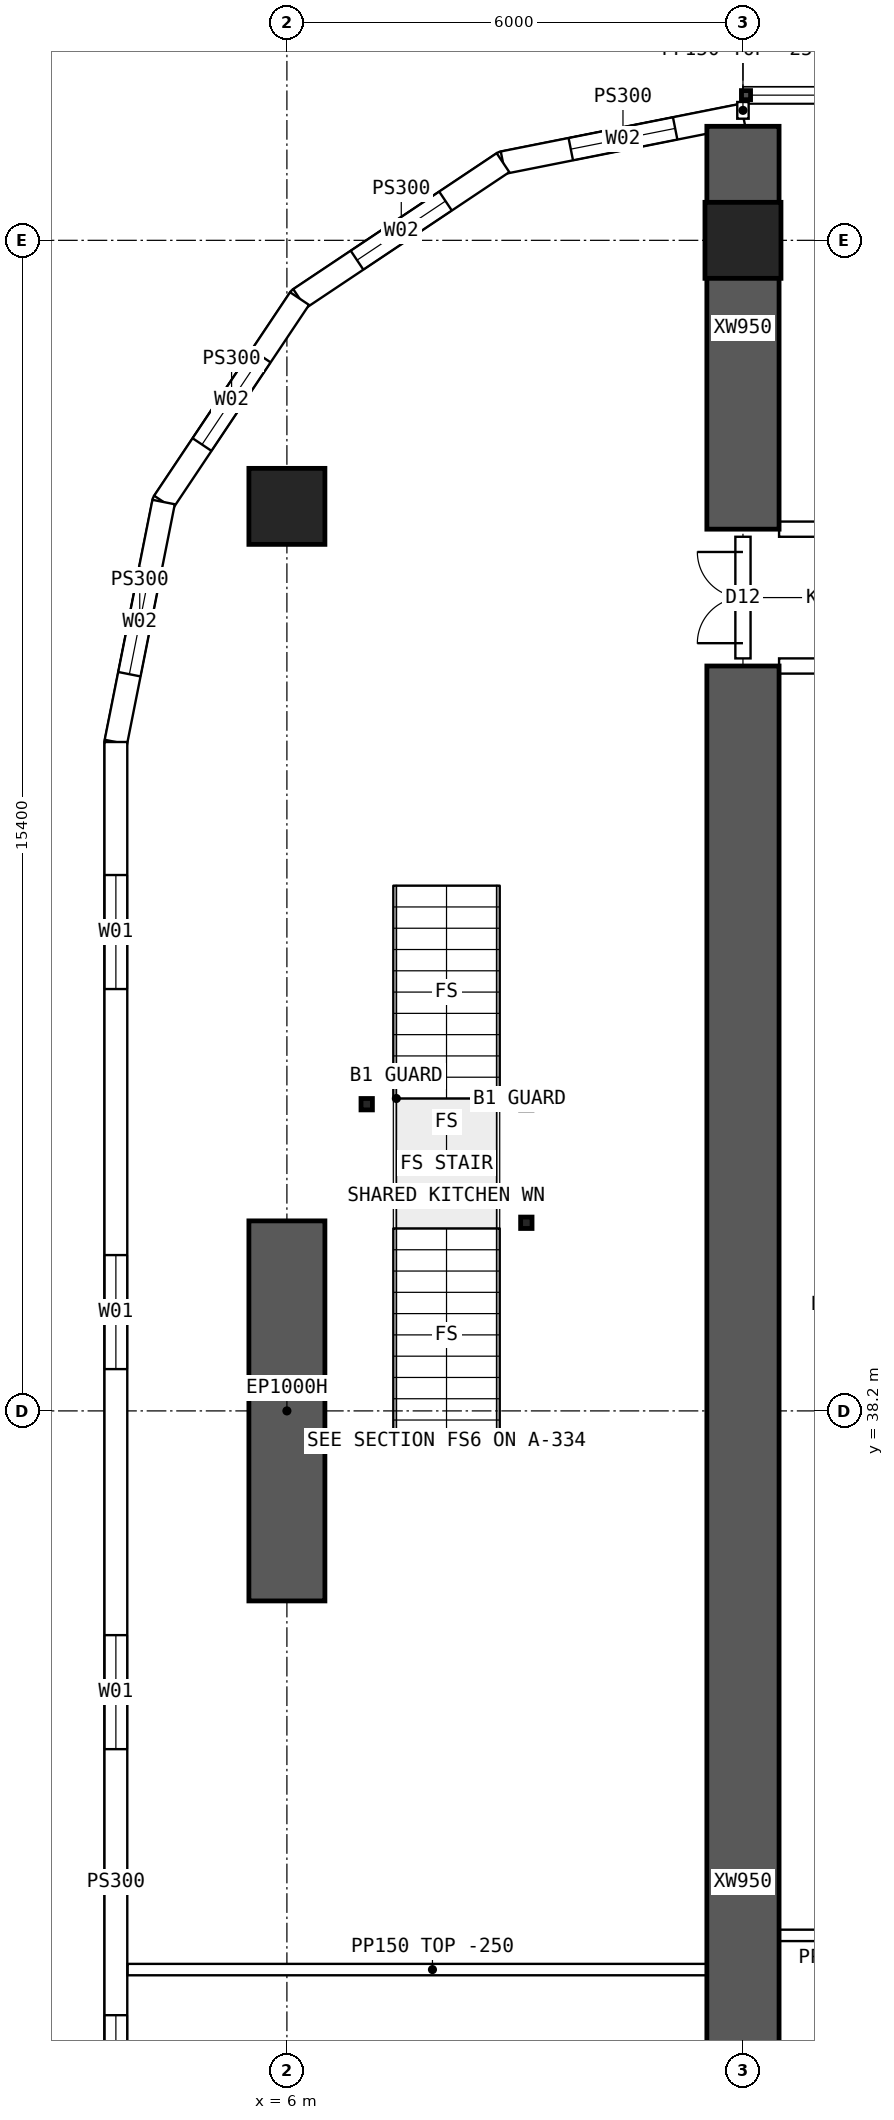
"""IFC4 building model, lengths in metres.
Left out: names, types, materials, properties, quantities, classifications, styles, units other than length and angle.
Written with IfcOpenShell. Run it as: python <this file> out.ifc"""

import sys

from ifc_helpers import new_model, si_unit, direction, frame, frame_2d, origin, origin_2d, place, context, subcontext, project, spatial, polyline, rectangle, hollow_rectangle, outline, extrude, element, fill, save


model = new_model("IFC4")
c1 = context("Model", 3, precision=1e-05, world=origin(), true_north=direction((0.0, 1.0)))
c2 = subcontext(c1, "Body", "Model", "MODEL_VIEW")
j1 = project(units=[si_unit("LENGTHUNIT", "METRE"), si_unit("PLANEANGLEUNIT", "RADIAN")], contexts=[c1])
p1 = place(None, origin())
s1 = spatial("IfcSite", under=j1, at=p1, CompositionType="ELEMENT")
p2 = place(p1, origin())
s2 = spatial("IfcBuilding", under=s1, at=p2, CompositionType="ELEMENT")
p3 = place(p2, frame((0.0, 0.0, 99.4)))
s3 = spatial("IfcBuildingStorey", under=s2, at=p3, CompositionType="ELEMENT", Elevation=99.4)
for number, where, z_axis, x_axis in (
    (1, (12.0, 53.6, 0.0), (0.0, 0.0, 1.0), (1.0, 0.0, 0.0)),
    (2, (6.0, 50.1, 0.0), (0.0, 0.0, 1.0), (1.0, 0.0, 0.0)),
):
    element("IfcColumn", number, at=place(p3, frame(where, z_axis=z_axis, x_axis=x_axis)), inside=s3, PredefinedType="COLUMN", context=c2, shape_type="SweptSolid", body=[
        extrude(hollow_rectangle(XDim=1.0, YDim=1.0, WallThickness=0.1, at=origin_2d()), origin(), (0.0, 0.0, 1.0), 3.75),
    ])
p4 = place(p3, frame((6.0, 35.7, 0.0), z_axis=(0.0, 0.0, 1.0), x_axis=(0.0, 1.0, 0.0)))
e3 = element("IfcWall", 3, at=p4, inside=s3, PredefinedType="SHEAR", context=c2, shape_type="SweptSolid", body=[
    extrude(rectangle(XDim=5.0, YDim=1.0, at=frame_2d((2.5, 0.0))), origin(), (0.0, 0.0, 1.0), 3.75),
])
p5 = place(p3, frame((12.0, 49.8, 0.0), z_axis=(0.0, 0.0, 1.0), x_axis=(0.0, 1.0, 0.0)))
e4 = element("IfcWall", 4, at=p5, inside=s3, PredefinedType="SHEAR", context=c2, shape_type="SweptSolid", body=[
    extrude(rectangle(XDim=5.3, YDim=0.95, at=frame_2d((2.65, 0.0))), origin(), (0.0, 0.0, 1.0), 3.75),
])
p6 = place(p3, frame((12.0, 16.0, 0.0), z_axis=(0.0, 0.0, 1.0), x_axis=(0.0, 1.0, 0.0)))
e5 = element("IfcWall", 5, at=p6, inside=s3, PredefinedType="SHEAR", context=c2, shape_type="SweptSolid", body=[
    extrude(rectangle(XDim=32.0, YDim=0.95, at=frame_2d((16.0, 0.0))), origin(), (0.0, 0.0, 1.0), 3.75),
])
p7 = place(p3, frame((3.75, 47.0, 0.0), z_axis=(0.0, 0.0, 1.0), x_axis=(0.0, -1.0, 0.0)))
e6 = element("IfcWall", 6, at=p7, inside=s3, PredefinedType="SOLIDWALL", context=c2, shape_type="SweptSolid", body=[
    extrude(outline(polyline([(-0.015, -0.15), (30.015, -0.15), (29.985, 0.15), (0.015, 0.15), (-0.015, -0.15)])), origin(), (0.0, 0.0, 1.0), 3.5),
])
p8 = place(p7, frame((1.75, 0.0, 0.9)))
e7 = element("IfcOpeningElement", 7, at=p8, cuts=e6, PredefinedType="OPENING", context=c2, shape_type="SweptSolid", body=[
    extrude(rectangle(XDim=1.5, YDim=2.0, at=frame_2d((0.75, 1.0))), frame((0.0, 0.16, 0.0), z_axis=(0.0, -1.0, 0.0), x_axis=(1.0, 0.0, 0.0)), (0.0, 0.0, 1.0), 0.32),
])
p9 = place(p7, frame((6.75, 0.0, 0.9)))
e8 = element("IfcOpeningElement", 8, at=p9, cuts=e6, PredefinedType="OPENING", context=c2, shape_type="SweptSolid", body=[
    extrude(rectangle(XDim=1.5, YDim=2.0, at=frame_2d((0.75, 1.0))), frame((0.0, 0.16, 0.0), z_axis=(0.0, -1.0, 0.0), x_axis=(1.0, 0.0, 0.0)), (0.0, 0.0, 1.0), 0.32),
])
p10 = place(p7, frame((11.75, 0.0, 0.9)))
e9 = element("IfcOpeningElement", 9, at=p10, cuts=e6, PredefinedType="OPENING", context=c2, shape_type="SweptSolid", body=[
    extrude(rectangle(XDim=1.5, YDim=2.0, at=frame_2d((0.75, 1.0))), frame((0.0, 0.16, 0.0), z_axis=(0.0, -1.0, 0.0), x_axis=(1.0, 0.0, 0.0)), (0.0, 0.0, 1.0), 0.32),
])
p11 = place(p7, frame((16.75, 0.0, 0.9)))
e10 = element("IfcOpeningElement", 10, at=p11, cuts=e6, PredefinedType="OPENING", context=c2, shape_type="SweptSolid", body=[
    extrude(rectangle(XDim=1.5, YDim=2.0, at=frame_2d((0.75, 1.0))), frame((0.0, 0.16, 0.0), z_axis=(0.0, -1.0, 0.0), x_axis=(1.0, 0.0, 0.0)), (0.0, 0.0, 1.0), 0.32),
])
p12 = place(p7, frame((21.75, 0.0, 0.9)))
e11 = element("IfcOpeningElement", 11, at=p12, cuts=e6, PredefinedType="OPENING", context=c2, shape_type="SweptSolid", body=[
    extrude(rectangle(XDim=1.5, YDim=2.0, at=frame_2d((0.75, 1.0))), frame((0.0, 0.16, 0.0), z_axis=(0.0, -1.0, 0.0), x_axis=(1.0, 0.0, 0.0)), (0.0, 0.0, 1.0), 0.32),
])
p13 = place(p7, frame((26.75, 0.0, 0.9)))
e12 = element("IfcOpeningElement", 12, at=p13, cuts=e6, PredefinedType="OPENING", context=c2, shape_type="SweptSolid", body=[
    extrude(rectangle(XDim=1.5, YDim=2.0, at=frame_2d((0.75, 1.0))), frame((0.0, 0.16, 0.0), z_axis=(0.0, -1.0, 0.0), x_axis=(1.0, 0.0, 0.0)), (0.0, 0.0, 1.0), 0.32),
])
p14 = place(p3, frame((12.0, 55.25, 0.0), z_axis=(0.0, 0.0, 1.0), x_axis=(-0.980787251524, -0.195080412259, 0.0)))
e13 = element("IfcWall", 13, at=p14, inside=s3, PredefinedType="SOLIDWALL", context=c2, shape_type="SweptSolid", body=[
    extrude(outline(polyline([(-0.03, -0.15), (3.249, -0.15), (3.189, 0.15), (0.03, 0.15), (-0.03, -0.15)])), origin(), (0.0, 0.0, 1.0), 3.5),
])
p15 = place(p14, frame((0.909, 0.0, 0.9)))
e14 = element("IfcOpeningElement", 14, at=p15, cuts=e13, PredefinedType="OPENING", context=c2, shape_type="SweptSolid", body=[
    extrude(rectangle(XDim=1.4, YDim=1.8, at=frame_2d((0.7, 0.9))), frame((0.0, 0.16, 0.0), z_axis=(0.0, -1.0, 0.0), x_axis=(1.0, 0.0, 0.0)), (0.0, 0.0, 1.0), 0.32),
])
p16 = place(p3, frame((8.843, 54.622, 0.0), z_axis=(0.0, 0.0, 1.0), x_axis=(-0.831443069936, -0.555609954424, 0.0)))
e15 = element("IfcWall", 15, at=p16, inside=s3, PredefinedType="SOLIDWALL", context=c2, shape_type="SweptSolid", body=[
    extrude(outline(polyline([(-0.03, -0.15), (3.249, -0.15), (3.189, 0.15), (0.03, 0.15), (-0.03, -0.15)])), origin(), (0.0, 0.0, 1.0), 3.5),
])
p17 = place(p16, frame((0.909, 0.0, 0.9)))
e16 = element("IfcOpeningElement", 16, at=p17, cuts=e15, PredefinedType="OPENING", context=c2, shape_type="SweptSolid", body=[
    extrude(rectangle(XDim=1.4, YDim=1.8, at=frame_2d((0.7, 0.9))), frame((0.0, 0.16, 0.0), z_axis=(0.0, -1.0, 0.0), x_axis=(1.0, 0.0, 0.0)), (0.0, 0.0, 1.0), 0.32),
])
p18 = place(p3, frame((6.167, 52.833, 0.0), z_axis=(0.0, 0.0, 1.0), x_axis=(-0.555609954424, -0.831443069936, 0.0)))
e17 = element("IfcWall", 17, at=p18, inside=s3, PredefinedType="SOLIDWALL", context=c2, shape_type="SweptSolid", body=[
    extrude(outline(polyline([(-0.03, -0.15), (3.249, -0.15), (3.189, 0.15), (0.03, 0.15), (-0.03, -0.15)])), origin(), (0.0, 0.0, 1.0), 3.5),
])
p19 = place(p18, frame((0.909, 0.0, 0.9)))
e18 = element("IfcOpeningElement", 18, at=p19, cuts=e17, PredefinedType="OPENING", context=c2, shape_type="SweptSolid", body=[
    extrude(rectangle(XDim=1.4, YDim=1.8, at=frame_2d((0.7, 0.9))), frame((0.0, 0.16, 0.0), z_axis=(0.0, -1.0, 0.0), x_axis=(1.0, 0.0, 0.0)), (0.0, 0.0, 1.0), 0.32),
])
p20 = place(p3, frame((4.378, 50.157, 0.0), z_axis=(0.0, 0.0, 1.0), x_axis=(-0.195080412259, -0.980787251524, 0.0)))
e19 = element("IfcWall", 19, at=p20, inside=s3, PredefinedType="SOLIDWALL", context=c2, shape_type="SweptSolid", body=[
    extrude(outline(polyline([(-0.03, -0.15), (3.234, -0.15), (3.204, 0.15), (0.03, 0.15), (-0.03, -0.15)])), origin(), (0.0, 0.0, 1.0), 3.5),
])
p21 = place(p20, frame((0.909, 0.0, 0.9)))
e20 = element("IfcOpeningElement", 20, at=p21, cuts=e19, PredefinedType="OPENING", context=c2, shape_type="SweptSolid", body=[
    extrude(rectangle(XDim=1.4, YDim=1.8, at=frame_2d((0.7, 0.9))), frame((0.0, 0.16, 0.0), z_axis=(0.0, -1.0, 0.0), x_axis=(1.0, 0.0, 0.0)), (0.0, 0.0, 1.0), 0.32),
])
p22 = place(p3, frame((12.475, 49.8, 0.0), z_axis=(0.0, 0.0, 1.0), x_axis=(1.0, 0.0, 0.0)))
e21 = element("IfcWall", 21, at=p22, inside=s3, PredefinedType="SOLIDWALL", context=c2, shape_type="SweptSolid", body=[
    extrude(outline(polyline([(0.0, 0.0), (5.05, 0.0), (5.05, 3.1), (0.0, 3.1), (0.0, 0.0)])), frame((0.0, 0.1, 0.0), z_axis=(0.0, -1.0, 0.0), x_axis=(1.0, 0.0, 0.0)), (0.0, 0.0, 1.0), 0.2),
])
p23 = place(p22, frame((0.6, 0.0, 0.0)))
e22 = element("IfcOpeningElement", 22, at=p23, cuts=e21, PredefinedType="OPENING", context=c2, shape_type="SweptSolid", body=[
    extrude(rectangle(XDim=1.0, YDim=2.1, at=frame_2d((0.5, 1.05))), frame((0.0, 0.11, 0.0), z_axis=(0.0, -1.0, 0.0), x_axis=(1.0, 0.0, 0.0)), (0.0, 0.0, 1.0), 0.22),
])
p24 = place(p3, frame((12.475, 48.0, 0.0), z_axis=(0.0, 0.0, 1.0), x_axis=(1.0, 0.0, 0.0)))
e23 = element("IfcWall", 23, at=p24, inside=s3, PredefinedType="SOLIDWALL", context=c2, shape_type="SweptSolid", body=[
    extrude(rectangle(XDim=5.05, YDim=0.2, at=frame_2d((2.525, 0.0))), origin(), (0.0, 0.0, 1.0), 3.5),
])
p25 = place(p24, frame((3.325, 0.0, 0.0)))
e24 = element("IfcOpeningElement", 24, at=p25, cuts=e23, PredefinedType="OPENING", context=c2, shape_type="SweptSolid", body=[
    extrude(rectangle(XDim=1.6, YDim=2.1, at=frame_2d((0.8, 1.05))), frame((0.0, 0.11, 0.0), z_axis=(0.0, -1.0, 0.0), x_axis=(1.0, 0.0, 0.0)), (0.0, 0.0, 1.0), 0.22),
])
p26 = place(p3, frame((12.0, 31.3, 0.0), z_axis=(0.0, 0.0, 1.0), x_axis=(1.0, 0.0, 0.0)))
e25 = element("IfcWall", 25, at=p26, inside=s3, PredefinedType="PARTITIONING", context=c2, shape_type="SweptSolid", body=[
    extrude(rectangle(XDim=3.6, YDim=0.15, at=frame_2d((1.8, 0.0))), origin(), (0.0, 0.0, 1.0), 3.5),
])
p27 = place(p3, frame((3.905, 30.85, 0.0), z_axis=(0.0, 0.0, 1.0), x_axis=(1.0, 0.0, 0.0)))
e26 = element("IfcWall", 26, at=p27, inside=s3, PredefinedType="PARTITIONING", context=c2, shape_type="SweptSolid", body=[
    extrude(outline(polyline([(0.0, 0.0), (8.02, 0.0), (8.02, 3.5), (2.397, 3.5), (2.395, 3.05), (1.797, 3.05), (1.795, 3.5), (0.0, 3.5), (0.0, 0.0)])), frame((0.0, 0.075, 0.0), z_axis=(0.0, -1.0, 0.0), x_axis=(1.0, 0.0, 0.0)), (0.0, 0.0, 1.0), 0.15),
])
p28 = place(p3, frame((12.0, 48.1, 0.0), z_axis=(0.0, 0.0, 1.0), x_axis=(0.0, 1.0, 0.0)))
e27 = element("IfcWall", 27, at=p28, inside=s3, PredefinedType="SOLIDWALL", context=c2, shape_type="SweptSolid", body=[
    extrude(outline(polyline([(0.0, 0.0), (1.6, 0.0), (1.6, 3.1), (0.0, 3.1), (0.0, 0.0)])), frame((0.0, 0.1, 0.0), z_axis=(0.0, -1.0, 0.0), x_axis=(1.0, 0.0, 0.0)), (0.0, 0.0, 1.0), 0.2),
])
p29 = place(p28, frame((0.2, 0.0, 0.0)))
e28 = element("IfcOpeningElement", 28, at=p29, cuts=e27, PredefinedType="OPENING", context=c2, shape_type="SweptSolid", body=[
    extrude(rectangle(XDim=1.2, YDim=2.1, at=frame_2d((0.6, 1.05))), frame((0.0, 0.11, 0.0), z_axis=(0.0, -1.0, 0.0), x_axis=(1.0, 0.0, 0.0)), (0.0, 0.0, 1.0), 0.22),
])
p30 = place(p3, frame((12.0, 55.2, 0.0), z_axis=(0.0, 0.0, 1.0), x_axis=(0.0, 1.0, 0.0)))
e29 = element("IfcWall", 29, at=p30, inside=s3, PredefinedType="PARTITIONING", context=c2, shape_type="SweptSolid", body=[
    extrude(rectangle(XDim=0.22, YDim=0.15, at=frame_2d((0.11, 0.0))), origin(), (0.0, 0.0, 1.0), 3.5),
])
for number, where, z_axis, x_axis in (
    (30, (9.15, 40.675, 0.0), (0.0, 0.0, 1.0), (1.0, 0.0, 0.0)),
    (31, (7.05, 42.235, 0.0), (0.0, 0.0, 1.0), (1.0, 0.0, 0.0)),
    (32, (9.15, 42.235, 0.0), (0.0, 0.0, 1.0), (1.0, 0.0, 0.0)),
):
    element("IfcColumn", number, at=place(p3, frame(where, z_axis=z_axis, x_axis=x_axis)), inside=s3, PredefinedType="COLUMN", context=c2, shape_type="SweptSolid", body=[
        extrude(hollow_rectangle(XDim=0.15, YDim=0.15, WallThickness=0.008, at=origin_2d()), origin(), (0.0, 0.0, 1.0), 3.5),
    ])
p31 = place(p8, origin())
e33 = element("IfcWindow", 33, at=p31, inside=s3, PartitioningType="SINGLE_PANEL", PredefinedType="WINDOW", context=c2, shape_type="SweptSolid", body=[
    extrude(rectangle(XDim=1.5, YDim=2.0, at=frame_2d((0.75, 1.0))), frame((0.0, 0.03, 0.0), z_axis=(0.0, -1.0, 0.0), x_axis=(1.0, 0.0, 0.0)), (0.0, 0.0, 1.0), 0.06),
])
fill(e7, e33)
p32 = place(p9, origin())
e34 = element("IfcWindow", 34, at=p32, inside=s3, PartitioningType="SINGLE_PANEL", PredefinedType="WINDOW", context=c2, shape_type="SweptSolid", body=[
    extrude(rectangle(XDim=1.5, YDim=2.0, at=frame_2d((0.75, 1.0))), frame((0.0, 0.03, 0.0), z_axis=(0.0, -1.0, 0.0), x_axis=(1.0, 0.0, 0.0)), (0.0, 0.0, 1.0), 0.06),
])
fill(e8, e34)
p33 = place(p10, origin())
e35 = element("IfcWindow", 35, at=p33, inside=s3, PartitioningType="SINGLE_PANEL", PredefinedType="WINDOW", context=c2, shape_type="SweptSolid", body=[
    extrude(rectangle(XDim=1.5, YDim=2.0, at=frame_2d((0.75, 1.0))), frame((0.0, 0.03, 0.0), z_axis=(0.0, -1.0, 0.0), x_axis=(1.0, 0.0, 0.0)), (0.0, 0.0, 1.0), 0.06),
])
fill(e9, e35)
p34 = place(p11, origin())
e36 = element("IfcWindow", 36, at=p34, inside=s3, PartitioningType="SINGLE_PANEL", PredefinedType="WINDOW", context=c2, shape_type="SweptSolid", body=[
    extrude(rectangle(XDim=1.5, YDim=2.0, at=frame_2d((0.75, 1.0))), frame((0.0, 0.03, 0.0), z_axis=(0.0, -1.0, 0.0), x_axis=(1.0, 0.0, 0.0)), (0.0, 0.0, 1.0), 0.06),
])
fill(e10, e36)
p35 = place(p15, origin())
e37 = element("IfcWindow", 37, at=p35, inside=s3, PartitioningType="SINGLE_PANEL", PredefinedType="WINDOW", context=c2, shape_type="SweptSolid", body=[
    extrude(rectangle(XDim=1.4, YDim=1.8, at=frame_2d((0.7, 0.9))), frame((0.0, 0.03, 0.0), z_axis=(0.0, -1.0, 0.0), x_axis=(1.0, 0.0, 0.0)), (0.0, 0.0, 1.0), 0.06),
])
fill(e14, e37)
p36 = place(p17, origin())
e38 = element("IfcWindow", 38, at=p36, inside=s3, PartitioningType="SINGLE_PANEL", PredefinedType="WINDOW", context=c2, shape_type="SweptSolid", body=[
    extrude(rectangle(XDim=1.4, YDim=1.8, at=frame_2d((0.7, 0.9))), frame((0.0, 0.03, 0.0), z_axis=(0.0, -1.0, 0.0), x_axis=(1.0, 0.0, 0.0)), (0.0, 0.0, 1.0), 0.06),
])
fill(e16, e38)
p37 = place(p19, origin())
e39 = element("IfcWindow", 39, at=p37, inside=s3, PartitioningType="SINGLE_PANEL", PredefinedType="WINDOW", context=c2, shape_type="SweptSolid", body=[
    extrude(rectangle(XDim=1.4, YDim=1.8, at=frame_2d((0.7, 0.9))), frame((0.0, 0.03, 0.0), z_axis=(0.0, -1.0, 0.0), x_axis=(1.0, 0.0, 0.0)), (0.0, 0.0, 1.0), 0.06),
])
fill(e18, e39)
p38 = place(p21, origin())
e40 = element("IfcWindow", 40, at=p38, inside=s3, PartitioningType="SINGLE_PANEL", PredefinedType="WINDOW", context=c2, shape_type="SweptSolid", body=[
    extrude(rectangle(XDim=1.4, YDim=1.8, at=frame_2d((0.7, 0.9))), frame((0.0, 0.03, 0.0), z_axis=(0.0, -1.0, 0.0), x_axis=(1.0, 0.0, 0.0)), (0.0, 0.0, 1.0), 0.06),
])
fill(e20, e40)
p39 = place(p29, origin())
e41 = element("IfcDoor", 41, at=p39, inside=s3, OperationType="DOUBLE_DOOR_SINGLE_SWING", PredefinedType="DOOR", context=c2, shape_type="SweptSolid", body=[
    extrude(rectangle(XDim=1.2, YDim=2.1, at=frame_2d((0.6, 1.05))), frame((0.0, 0.025, 0.0), z_axis=(0.0, -1.0, 0.0), x_axis=(1.0, 0.0, 0.0)), (0.0, 0.0, 1.0), 0.05),
])
fill(e28, e41)
save(model, sys.argv[1])
